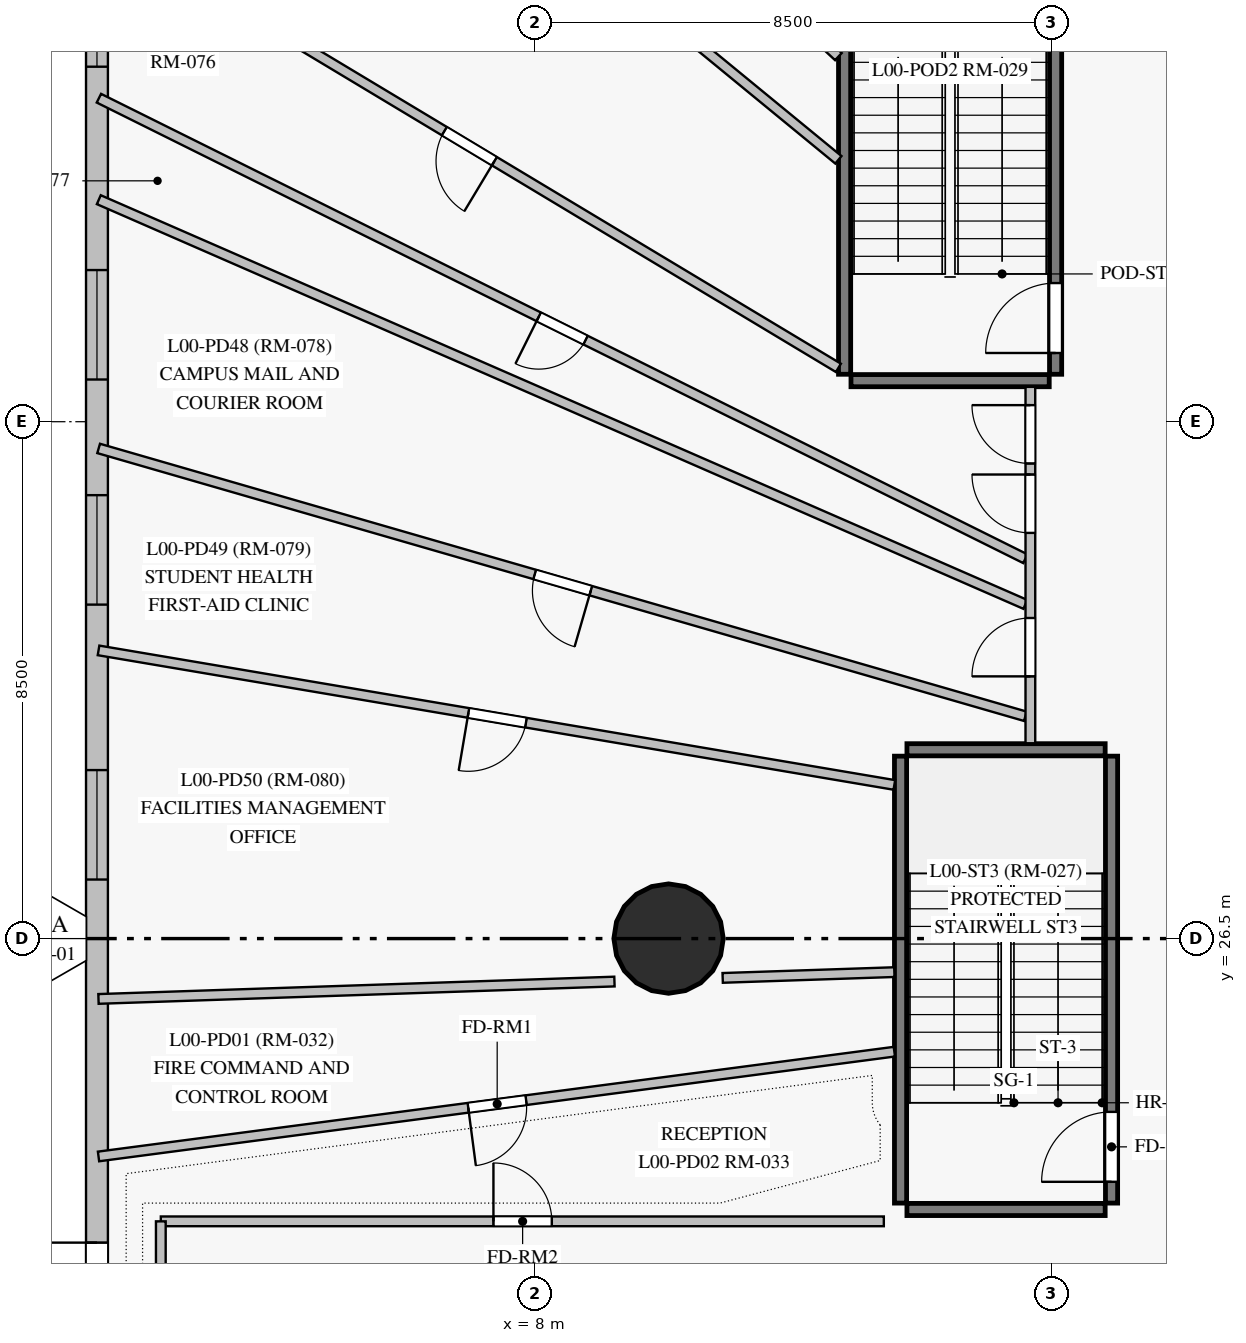
"""IFC4 building model, lengths in metres.
Left out: names, types, materials, properties, quantities, classifications, styles, units other than length and angle.
Written with IfcOpenShell. Run it as: python <this file> out.ifc"""

import sys

from ifc_helpers import new_model, si_unit, direction, frame, frame_2d, origin, origin_with_axes, origin_2d, place, context, subcontext, project, spatial, rectangle, circle, extrude, source, transform, mapped, element, fill, save


model = new_model("IFC4")
c1 = context("Model", 3, precision=1e-05, world=origin(), true_north=direction((0.0, 1.0)))
c2 = subcontext(c1, "Body", "Model", "MODEL_VIEW")
j1 = project(units=[si_unit("LENGTHUNIT", "METRE"), si_unit("PLANEANGLEUNIT", "RADIAN")], contexts=[c1])
p1 = place(None, origin())
s1 = spatial("IfcSite", under=j1, at=p1, CompositionType="ELEMENT")
p2 = place(p1, origin())
s2 = spatial("IfcBuilding", under=s1, at=p2, CompositionType="ELEMENT")
p3 = place(p2, origin())
s3 = spatial("IfcBuildingStorey", under=s2, at=p3, CompositionType="ELEMENT", Elevation=0.0)
m1 = source(origin_with_axes(), c2, "Body", "SweptSolid", [
    extrude(circle(Radius=0.9, at=origin_2d()), origin(), (0.0, 0.0, 1.0), 4.5),
])
p4 = place(p3, frame((10.2, 26.5, 0.0), z_axis=(0.0, 0.0, 1.0), x_axis=(1.0, 0.0, 0.0)))
e1 = element("IfcColumn", 1, at=p4, inside=s3, PredefinedType="COLUMN", context=c2, shape_type="MappedRepresentation", body=[
    mapped(m1, transform((0.0, 0.0, 0.0), scale=1.0)),
])
p5 = place(p3, frame((0.8, 2.5, 0.0), z_axis=(0.0, 0.0, 1.0), x_axis=(0.0, 1.0, 0.0)))
e2 = element("IfcWall", 2, at=p5, inside=s3, PredefinedType="SOLIDWALL", context=c2, shape_type="SweptSolid", body=[
    extrude(rectangle(XDim=48.0, YDim=0.36, at=frame_2d((24.0, 0.0))), origin(), (0.0, 0.0, 1.0), 4.2),
])
p6 = place(p5, frame((42.816, 0.0, 0.85)))
e3 = element("IfcOpeningElement", 3, at=p6, cuts=e2, PredefinedType="OPENING", context=c2, shape_type="SweptSolid", body=[
    extrude(rectangle(XDim=1.8, YDim=2.2, at=frame_2d((0.9, 1.1))), frame((0.0, 0.19, 0.0), z_axis=(0.0, -1.0, 0.0), x_axis=(1.0, 0.0, 0.0)), (0.0, 0.0, 1.0), 0.38),
])
p7 = place(p5, frame((38.338, 0.0, 0.85)))
e4 = element("IfcOpeningElement", 4, at=p7, cuts=e2, PredefinedType="OPENING", context=c2, shape_type="SweptSolid", body=[
    extrude(rectangle(XDim=1.8, YDim=2.2, at=frame_2d((0.9, 1.1))), frame((0.0, 0.19, 0.0), z_axis=(0.0, -1.0, 0.0), x_axis=(1.0, 0.0, 0.0)), (0.0, 0.0, 1.0), 0.38),
])
p8 = place(p5, frame((33.194, 0.0, 0.85)))
e5 = element("IfcOpeningElement", 5, at=p8, cuts=e2, PredefinedType="OPENING", context=c2, shape_type="SweptSolid", body=[
    extrude(rectangle(XDim=1.8, YDim=2.2, at=frame_2d((0.9, 1.1))), frame((0.0, 0.19, 0.0), z_axis=(0.0, -1.0, 0.0), x_axis=(1.0, 0.0, 0.0)), (0.0, 0.0, 1.0), 0.38),
])
p9 = place(p5, frame((29.492, 0.0, 0.85)))
e6 = element("IfcOpeningElement", 6, at=p9, cuts=e2, PredefinedType="OPENING", context=c2, shape_type="SweptSolid", body=[
    extrude(rectangle(XDim=1.8, YDim=2.2, at=frame_2d((0.9, 1.1))), frame((0.0, 0.19, 0.0), z_axis=(0.0, -1.0, 0.0), x_axis=(1.0, 0.0, 0.0)), (0.0, 0.0, 1.0), 0.38),
])
p10 = place(p5, frame((24.971, 0.0, 0.85)))
e7 = element("IfcOpeningElement", 7, at=p10, cuts=e2, PredefinedType="OPENING", context=c2, shape_type="SweptSolid", body=[
    extrude(rectangle(XDim=1.8, YDim=2.2, at=frame_2d((0.9, 1.1))), frame((0.0, 0.19, 0.0), z_axis=(0.0, -1.0, 0.0), x_axis=(1.0, 0.0, 0.0)), (0.0, 0.0, 1.0), 0.38),
])
p11 = place(p5, frame((12.315, 0.0, 0.85)))
e8 = element("IfcOpeningElement", 8, at=p11, cuts=e2, PredefinedType="OPENING", context=c2, shape_type="SweptSolid", body=[
    extrude(rectangle(XDim=1.8, YDim=2.2, at=frame_2d((0.9, 1.1))), frame((0.0, 0.19, 0.0), z_axis=(0.0, -1.0, 0.0), x_axis=(1.0, 0.0, 0.0)), (0.0, 0.0, 1.0), 0.38),
])
p12 = place(p5, frame((6.841, 0.0, 0.85)))
e9 = element("IfcOpeningElement", 9, at=p12, cuts=e2, PredefinedType="OPENING", context=c2, shape_type="SweptSolid", body=[
    extrude(rectangle(XDim=1.8, YDim=2.2, at=frame_2d((0.9, 1.1))), frame((0.0, 0.19, 0.0), z_axis=(0.0, -1.0, 0.0), x_axis=(1.0, 0.0, 0.0)), (0.0, 0.0, 1.0), 0.38),
])
p13 = place(p5, frame((3.189, 0.0, 0.85)))
e10 = element("IfcOpeningElement", 10, at=p13, cuts=e2, PredefinedType="OPENING", context=c2, shape_type="SweptSolid", body=[
    extrude(rectangle(XDim=1.8, YDim=2.2, at=frame_2d((0.9, 1.1))), frame((0.0, 0.19, 0.0), z_axis=(0.0, -1.0, 0.0), x_axis=(1.0, 0.0, 0.0)), (0.0, 0.0, 1.0), 0.38),
])
p14 = place(p5, frame((17.2, 0.0, 0.0)))
e11 = element("IfcOpeningElement", 11, at=p14, cuts=e2, PredefinedType="OPENING", context=c2, shape_type="SweptSolid", body=[
    extrude(rectangle(XDim=1.8, YDim=2.3, at=frame_2d((0.9, 1.15))), frame((0.0, 0.19, 0.0), z_axis=(0.0, -1.0, 0.0), x_axis=(1.0, 0.0, 0.0)), (0.0, 0.0, 1.0), 0.38),
])
p15 = place(p3, frame((14.015, 22.15, 0.0), z_axis=(0.0, 0.0, 1.0), x_axis=(0.0, 1.0, 0.0)))
e12 = element("IfcWall", 12, at=p15, inside=s3, PredefinedType="SHEAR", context=c2, shape_type="SweptSolid", body=[
    extrude(rectangle(XDim=7.35, YDim=0.2, at=frame_2d((3.675, 0.0))), origin(), (0.0, 0.0, 1.0), 4.2),
])
p16 = place(p3, frame((17.485, 22.15, 0.0), z_axis=(0.0, 0.0, 1.0), x_axis=(0.0, 1.0, 0.0)))
e13 = element("IfcWall", 13, at=p16, inside=s3, PredefinedType="SHEAR", context=c2, shape_type="SweptSolid", body=[
    extrude(rectangle(XDim=7.35, YDim=0.2, at=frame_2d((3.675, 0.0))), origin(), (0.0, 0.0, 1.0), 4.2),
])
p17 = place(p16, frame((0.35, 0.0, 0.0)))
e14 = element("IfcOpeningElement", 14, at=p17, cuts=e13, PredefinedType="OPENING", context=c2, shape_type="SweptSolid", body=[
    extrude(rectangle(XDim=1.15, YDim=2.15, at=frame_2d((0.575, 1.075))), frame((0.0, 0.11, 0.0), z_axis=(0.0, -1.0, 0.0), x_axis=(1.0, 0.0, 0.0)), (0.0, 0.0, 1.0), 0.22),
])
p18 = place(p3, frame((13.095, 35.78, 0.0), z_axis=(0.0, 0.0, 1.0), x_axis=(0.0, 1.0, 0.0)))
e15 = element("IfcWall", 15, at=p18, inside=s3, PredefinedType="SHEAR", context=c2, shape_type="SweptSolid", body=[
    extrude(rectangle(XDim=7.35, YDim=0.2, at=frame_2d((3.675, 0.0))), origin(), (0.0, 0.0, 1.0), 4.2),
])
p19 = place(p3, frame((16.565, 35.78, 0.0), z_axis=(0.0, 0.0, 1.0), x_axis=(0.0, 1.0, 0.0)))
e16 = element("IfcWall", 16, at=p19, inside=s3, PredefinedType="SHEAR", context=c2, shape_type="SweptSolid", body=[
    extrude(rectangle(XDim=7.35, YDim=0.2, at=frame_2d((3.675, 0.0))), origin(), (0.0, 0.0, 1.0), 4.2),
])
p20 = place(p19, frame((0.35, 0.0, 0.0)))
e17 = element("IfcOpeningElement", 17, at=p20, cuts=e16, PredefinedType="OPENING", context=c2, shape_type="SweptSolid", body=[
    extrude(rectangle(XDim=1.15, YDim=2.15, at=frame_2d((0.575, 1.075))), frame((0.0, 0.11, 0.0), z_axis=(0.0, -1.0, 0.0), x_axis=(1.0, 0.0, 0.0)), (0.0, 0.0, 1.0), 0.22),
])
p21 = place(p3, frame((13.2, 35.675, 0.0), z_axis=(0.0, 0.0, 1.0), x_axis=(1.0, 0.0, 0.0)))
e18 = element("IfcWall", 18, at=p21, inside=s3, PredefinedType="SHEAR", context=c2, shape_type="SweptSolid", body=[
    extrude(rectangle(XDim=3.26, YDim=0.2, at=frame_2d((1.63, 0.0))), origin(), (0.0, 0.0, 1.0), 4.2),
])
for number, where, z_axis, x_axis in (
    (19, (14.12, 22.045, 0.0), (0.0, 0.0, 1.0), (1.0, 0.0, 0.0)),
    (20, (14.12, 29.605, 0.0), (0.0, 0.0, 1.0), (1.0, 0.0, 0.0)),
):
    element("IfcWall", number, at=place(p3, frame(where, z_axis=z_axis, x_axis=x_axis)), inside=s3, PredefinedType="SHEAR", context=c2, shape_type="SweptSolid", body=[
        extrude(rectangle(XDim=3.26, YDim=0.2, at=frame_2d((1.63, 0.0))), origin(), (0.0, 0.0, 1.0), 4.2),
    ])
p22 = place(p3, frame((16.068, 32.747, 0.0), z_axis=(0.0, 0.0, 1.0), x_axis=(-0.895480769827, 0.44510020318, 0.0)))
e21 = element("IfcWall", 21, at=p22, inside=s3, PredefinedType="PARTITIONING", context=c2, shape_type="SweptSolid", body=[
    extrude(rectangle(XDim=17.015, YDim=0.16, at=frame_2d((8.507, 0.0))), origin(), (0.0, 0.0, 1.0), 4.2),
])
p23 = place(p22, frame((8.077, 0.0, 0.0)))
e22 = element("IfcOpeningElement", 22, at=p23, cuts=e21, PredefinedType="OPENING", context=c2, shape_type="SweptSolid", body=[
    extrude(rectangle(XDim=0.86, YDim=2.04, at=frame_2d((0.43, 1.02))), frame((0.0, 0.09, 0.0), z_axis=(0.0, -1.0, 0.0), x_axis=(1.0, 0.0, 0.0)), (0.0, 0.0, 1.0), 0.18),
])
p24 = place(p3, frame((16.068, 31.996, 0.0), z_axis=(0.0, 0.0, 1.0), x_axis=(-0.916400464202, 0.400262650281, 0.0)))
e23 = element("IfcWall", 23, at=p24, inside=s3, PredefinedType="PARTITIONING", context=c2, shape_type="SweptSolid", body=[
    extrude(rectangle(XDim=16.628, YDim=0.16, at=frame_2d((8.314, 0.0))), origin(), (0.0, 0.0, 1.0), 4.2),
])
p25 = place(p3, frame((16.068, 30.156, 0.0), z_axis=(0.0, 0.0, 1.0), x_axis=(-0.960680893107, 0.277654860608, 0.0)))
e24 = element("IfcWall", 24, at=p25, inside=s3, PredefinedType="PARTITIONING", context=c2, shape_type="SweptSolid", body=[
    extrude(rectangle(XDim=15.864, YDim=0.16, at=frame_2d((7.932, 0.0))), origin(), (0.0, 0.0, 1.0), 4.2),
])
p26 = place(p25, frame((7.44, 0.0, 0.0)))
e25 = element("IfcOpeningElement", 25, at=p26, cuts=e24, PredefinedType="OPENING", context=c2, shape_type="SweptSolid", body=[
    extrude(rectangle(XDim=0.96, YDim=2.15, at=frame_2d((0.48, 1.075))), frame((0.0, 0.09, 0.0), z_axis=(0.0, -1.0, 0.0), x_axis=(1.0, 0.0, 0.0)), (0.0, 0.0, 1.0), 0.18),
])
p27 = place(p3, frame((12.993, 39.307, 0.0), z_axis=(0.0, 0.0, 1.0), x_axis=(-0.772944890545, 0.634473164272, 0.0)))
e26 = element("IfcWall", 26, at=p27, inside=s3, PredefinedType="PARTITIONING", context=c2, shape_type="SweptSolid", body=[
    extrude(rectangle(XDim=15.723, YDim=0.16, at=frame_2d((7.862, 0.0))), origin(), (0.0, 0.0, 1.0), 4.2),
])
p28 = place(p3, frame((12.993, 41.004, 0.0), z_axis=(0.0, 0.0, 1.0), x_axis=(-0.732268799171, 0.681015716236, 0.0)))
e27 = element("IfcWall", 27, at=p28, inside=s3, PredefinedType="PARTITIONING", context=c2, shape_type="SweptSolid", body=[
    extrude(rectangle(XDim=14.905, YDim=0.16, at=frame_2d((7.452, 0.0))), origin(), (0.0, 0.0, 1.0), 4.2),
])
p29 = place(p28, frame((6.96, 0.0, 0.0)))
e28 = element("IfcOpeningElement", 28, at=p29, cuts=e27, PredefinedType="OPENING", context=c2, shape_type="SweptSolid", body=[
    extrude(rectangle(XDim=0.96, YDim=2.15, at=frame_2d((0.48, 1.075))), frame((0.0, 0.09, 0.0), z_axis=(0.0, -1.0, 0.0), x_axis=(1.0, 0.0, 0.0)), (0.0, 0.0, 1.0), 0.18),
])
p30 = place(p3, frame((12.993, 35.885, 0.0), z_axis=(0.0, 0.0, 1.0), x_axis=(-0.857213350392, 0.514961427594, 0.0)))
e29 = element("IfcWall", 29, at=p30, inside=s3, PredefinedType="PARTITIONING", context=c2, shape_type="SweptSolid", body=[
    extrude(rectangle(XDim=14.184, YDim=0.16, at=frame_2d((7.092, 0.0))), origin(), (0.0, 0.0, 1.0), 4.2),
])
p31 = place(p30, frame((6.6, 0.0, 0.0)))
e30 = element("IfcOpeningElement", 30, at=p31, cuts=e29, PredefinedType="OPENING", context=c2, shape_type="SweptSolid", body=[
    extrude(rectangle(XDim=0.96, YDim=2.15, at=frame_2d((0.48, 1.075))), frame((0.0, 0.09, 0.0), z_axis=(0.0, -1.0, 0.0), x_axis=(1.0, 0.0, 0.0)), (0.0, 0.0, 1.0), 0.18),
])
p32 = place(p3, frame((13.913, 29.027, 0.0), z_axis=(0.0, 0.0, 1.0), x_axis=(-0.986009968188, 0.166686360073, 0.0)))
e31 = element("IfcWall", 31, at=p32, inside=s3, PredefinedType="PARTITIONING", context=c2, shape_type="SweptSolid", body=[
    extrude(rectangle(XDim=13.273, YDim=0.16, at=frame_2d((6.636, 0.0))), origin(), (0.0, 0.0, 1.0), 4.2),
])
p33 = place(p32, frame((6.144, 0.0, 0.0)))
e32 = element("IfcOpeningElement", 32, at=p33, cuts=e31, PredefinedType="OPENING", context=c2, shape_type="SweptSolid", body=[
    extrude(rectangle(XDim=0.96, YDim=2.15, at=frame_2d((0.48, 1.075))), frame((0.0, 0.09, 0.0), z_axis=(0.0, -1.0, 0.0), x_axis=(1.0, 0.0, 0.0)), (0.0, 0.0, 1.0), 0.18),
])
p34 = place(p3, frame((13.913, 24.64, 0.0), z_axis=(0.0, 0.0, 1.0), x_axis=(-0.991443338572, -0.130537758528, 0.0)))
e33 = element("IfcWall", 33, at=p34, inside=s3, PredefinedType="PARTITIONING", context=c2, shape_type="SweptSolid", body=[
    extrude(rectangle(XDim=13.2, YDim=0.16, at=frame_2d((6.6, 0.0))), origin(), (0.0, 0.0, 1.0), 4.2),
])
p35 = place(p34, frame((6.108, 0.0, 0.0)))
e34 = element("IfcOpeningElement", 34, at=p35, cuts=e33, PredefinedType="OPENING", context=c2, shape_type="SweptSolid", body=[
    extrude(rectangle(XDim=0.96, YDim=2.15, at=frame_2d((0.48, 1.075))), frame((0.0, 0.09, 0.0), z_axis=(0.0, -1.0, 0.0), x_axis=(1.0, 0.0, 0.0)), (0.0, 0.0, 1.0), 0.18),
])
p36 = place(p3, frame((1.85, 21.85, 0.0), z_axis=(0.0, 0.0, 1.0), x_axis=(1.0, 0.0, 0.0)))
e35 = element("IfcWall", 35, at=p36, inside=s3, PredefinedType="PARTITIONING", context=c2, shape_type="SweptSolid", body=[
    extrude(rectangle(XDim=11.89, YDim=0.16, at=frame_2d((5.945, 0.0))), origin(), (0.0, 0.0, 1.0), 4.2),
])
p37 = place(p36, frame((5.47, 0.0, 0.0)))
e36 = element("IfcOpeningElement", 36, at=p37, cuts=e35, PredefinedType="OPENING", context=c2, shape_type="SweptSolid", body=[
    extrude(rectangle(XDim=0.96, YDim=2.15, at=frame_2d((0.48, 1.075))), frame((0.0, 0.09, 0.0), z_axis=(0.0, -1.0, 0.0), x_axis=(1.0, 0.0, 0.0)), (0.0, 0.0, 1.0), 0.18),
])
p38 = place(p3, frame((0.825, 25.508, 0.0), z_axis=(0.0, 0.0, 1.0), x_axis=(0.999432873897, 0.033673885638, 0.0)))
e37 = element("IfcWall", 37, at=p38, inside=s3, PredefinedType="PARTITIONING", context=c2, shape_type="SweptSolid", body=[
    extrude(rectangle(XDim=8.49, YDim=0.16, at=frame_2d((4.245, 0.0))), origin(), (0.0, 0.0, 1.0), 4.2),
])
p39 = place(p3, frame((16.15, 29.712, 0.0), z_axis=(0.0, 0.0, 1.0), x_axis=(0.0, 1.0, 0.0)))
e38 = element("IfcWall", 38, at=p39, inside=s3, PredefinedType="PARTITIONING", context=c2, shape_type="SweptSolid", body=[
    extrude(rectangle(XDim=5.861, YDim=0.16, at=frame_2d((2.93, 0.0))), origin(), (0.0, 0.0, 1.0), 4.2),
])
p40 = place(p39, frame((3.459, 0.0, 0.0)))
e39 = element("IfcOpeningElement", 39, at=p40, cuts=e38, PredefinedType="OPENING", context=c2, shape_type="SweptSolid", body=[
    extrude(rectangle(XDim=0.96, YDim=2.15, at=frame_2d((0.48, 1.075))), frame((0.0, 0.09, 0.0), z_axis=(0.0, -1.0, 0.0), x_axis=(1.0, 0.0, 0.0)), (0.0, 0.0, 1.0), 0.18),
])
p41 = place(p39, frame((1.1, 0.0, 0.0)))
e40 = element("IfcOpeningElement", 40, at=p41, cuts=e38, PredefinedType="OPENING", context=c2, shape_type="SweptSolid", body=[
    extrude(rectangle(XDim=0.96, YDim=2.15, at=frame_2d((0.48, 1.075))), frame((0.0, 0.09, 0.0), z_axis=(0.0, -1.0, 0.0), x_axis=(1.0, 0.0, 0.0)), (0.0, 0.0, 1.0), 0.18),
])
p42 = place(p39, frame((4.601, 0.0, 0.0)))
e41 = element("IfcOpeningElement", 41, at=p42, cuts=e38, PredefinedType="OPENING", context=c2, shape_type="SweptSolid", body=[
    extrude(rectangle(XDim=0.96, YDim=2.15, at=frame_2d((0.48, 1.075))), frame((0.0, 0.09, 0.0), z_axis=(0.0, -1.0, 0.0), x_axis=(1.0, 0.0, 0.0)), (0.0, 0.0, 1.0), 0.18),
])
p43 = place(p3, frame((11.09, 25.854, 0.0), z_axis=(0.0, 0.0, 1.0), x_axis=(0.999434594921, 0.033622767225, 0.0)))
e42 = element("IfcWall", 42, at=p43, inside=s3, PredefinedType="PARTITIONING", context=c2, shape_type="SweptSolid", body=[
    extrude(rectangle(XDim=2.825, YDim=0.16, at=frame_2d((1.412, 0.0))), origin(), (0.0, 0.0, 1.0), 3.25),
])
p44 = place(p3, frame((1.85, 19.4, 0.0), z_axis=(0.0, 0.0, 1.0), x_axis=(0.0, 1.0, 0.0)))
e43 = element("IfcWall", 43, at=p44, inside=s3, PredefinedType="PARTITIONING", context=c2, shape_type="SweptSolid", body=[
    extrude(rectangle(XDim=2.45, YDim=0.16, at=frame_2d((1.225, 0.0))), origin(), (0.0, 0.0, 1.0), 4.2),
])
m2 = source(origin_with_axes(), c2, "Body", "SweptSolid", [
    extrude(rectangle(XDim=1.8, YDim=2.2, at=frame_2d((0.9, 1.1))), frame((0.0, 0.03, 0.0), z_axis=(0.0, -1.0, 0.0), x_axis=(1.0, 0.0, 0.0)), (0.0, 0.0, 1.0), 0.06),
])
p45 = place(p7, origin())
e44 = element("IfcWindow", 44, at=p45, inside=s3, PartitioningType="SINGLE_PANEL", PredefinedType="WINDOW", context=c2, shape_type="MappedRepresentation", body=[
    mapped(m2, transform((0.0, 0.0, 0.0), scale=1.0)),
])
fill(e4, e44)
p46 = place(p8, origin())
e45 = element("IfcWindow", 45, at=p46, inside=s3, PartitioningType="SINGLE_PANEL", PredefinedType="WINDOW", context=c2, shape_type="MappedRepresentation", body=[
    mapped(m2, transform((0.0, 0.0, 0.0), scale=1.0)),
])
fill(e5, e45)
p47 = place(p9, origin())
e46 = element("IfcWindow", 46, at=p47, inside=s3, PartitioningType="SINGLE_PANEL", PredefinedType="WINDOW", context=c2, shape_type="MappedRepresentation", body=[
    mapped(m2, transform((0.0, 0.0, 0.0), scale=1.0)),
])
fill(e6, e46)
p48 = place(p10, origin())
e47 = element("IfcWindow", 47, at=p48, inside=s3, PartitioningType="SINGLE_PANEL", PredefinedType="WINDOW", context=c2, shape_type="MappedRepresentation", body=[
    mapped(m2, transform((0.0, 0.0, 0.0), scale=1.0)),
])
fill(e7, e47)
m3 = source(origin_with_axes(), c2, "Body", "SweptSolid", [
    extrude(rectangle(XDim=1.8, YDim=2.3, at=frame_2d((0.9, 1.15))), frame((0.0, 0.025, 0.0), z_axis=(0.0, -1.0, 0.0), x_axis=(1.0, 0.0, 0.0)), (0.0, 0.0, 1.0), 0.05),
])
p49 = place(p14, origin())
e48 = element("IfcDoor", 48, at=p49, inside=s3, OperationType="DOUBLE_DOOR_SINGLE_SWING", PredefinedType="DOOR", context=c2, shape_type="MappedRepresentation", body=[
    mapped(m3, transform((0.0, 0.0, 0.0), scale=1.0)),
])
fill(e11, e48)
m4 = source(origin_with_axes(), c2, "Body", "SweptSolid", [
    extrude(rectangle(XDim=1.15, YDim=2.15, at=frame_2d((0.575, 1.075))), frame((0.0, 0.025, 0.0), z_axis=(0.0, -1.0, 0.0), x_axis=(1.0, 0.0, 0.0)), (0.0, 0.0, 1.0), 0.05),
])
p50 = place(p17, origin())
e49 = element("IfcDoor", 49, at=p50, inside=s3, OperationType="SINGLE_SWING_LEFT", PredefinedType="DOOR", context=c2, shape_type="MappedRepresentation", body=[
    mapped(m4, transform((0.0, 0.0, 0.0), scale=1.0)),
])
fill(e14, e49)
p51 = place(p20, origin())
e50 = element("IfcDoor", 50, at=p51, inside=s3, OperationType="SINGLE_SWING_LEFT", PredefinedType="DOOR", context=c2, shape_type="MappedRepresentation", body=[
    mapped(m4, transform((0.0, 0.0, 0.0), scale=1.0)),
])
fill(e17, e50)
m5 = source(origin_with_axes(), c2, "Body", "SweptSolid", [
    extrude(rectangle(XDim=0.96, YDim=2.15, at=frame_2d((0.48, 1.075))), frame((0.0, 0.025, 0.0), z_axis=(0.0, -1.0, 0.0), x_axis=(1.0, 0.0, 0.0)), (0.0, 0.0, 1.0), 0.05),
])
p52 = place(p35, origin())
e51 = element("IfcDoor", 51, at=p52, inside=s3, OperationType="SINGLE_SWING_RIGHT", PredefinedType="DOOR", context=c2, shape_type="MappedRepresentation", body=[
    mapped(m5, transform((0.0, 0.0, 0.0), scale=1.0)),
])
fill(e34, e51)
p53 = place(p37, origin())
e52 = element("IfcDoor", 52, at=p53, inside=s3, OperationType="SINGLE_SWING_LEFT", PredefinedType="DOOR", context=c2, shape_type="MappedRepresentation", body=[
    mapped(m5, transform((0.0, 0.0, 0.0), scale=1.0)),
])
fill(e36, e52)
p54 = place(p31, origin())
e53 = element("IfcDoor", 53, at=p54, inside=s3, OperationType="SINGLE_SWING_LEFT", PredefinedType="DOOR", context=c2, shape_type="MappedRepresentation", body=[
    mapped(m5, transform((0.0, 0.0, 0.0), scale=1.0)),
])
fill(e30, e53)
p55 = place(p40, origin())
e54 = element("IfcDoor", 54, at=p55, inside=s3, OperationType="SINGLE_SWING_RIGHT", PredefinedType="DOOR", context=c2, shape_type="MappedRepresentation", body=[
    mapped(m5, transform((0.0, 0.0, 0.0), scale=1.0)),
])
fill(e39, e54)
p56 = place(p41, origin())
e55 = element("IfcDoor", 55, at=p56, inside=s3, OperationType="SINGLE_SWING_LEFT", PredefinedType="DOOR", context=c2, shape_type="MappedRepresentation", body=[
    mapped(m5, transform((0.0, 0.0, 0.0), scale=1.0)),
])
fill(e40, e55)
p57 = place(p42, origin())
e56 = element("IfcDoor", 56, at=p57, inside=s3, OperationType="SINGLE_SWING_RIGHT", PredefinedType="DOOR", context=c2, shape_type="MappedRepresentation", body=[
    mapped(m5, transform((0.0, 0.0, 0.0), scale=1.0)),
])
fill(e41, e56)
p58 = place(p26, origin())
e57 = element("IfcDoor", 57, at=p58, inside=s3, OperationType="SINGLE_SWING_LEFT", PredefinedType="DOOR", context=c2, shape_type="MappedRepresentation", body=[
    mapped(m5, transform((0.0, 0.0, 0.0), scale=1.0)),
])
fill(e25, e57)
p59 = place(p33, origin())
e58 = element("IfcDoor", 58, at=p59, inside=s3, OperationType="SINGLE_SWING_RIGHT", PredefinedType="DOOR", context=c2, shape_type="MappedRepresentation", body=[
    mapped(m5, transform((0.0, 0.0, 0.0), scale=1.0)),
])
fill(e32, e58)
m6 = source(origin_with_axes(), c2, "Body", "SweptSolid", [
    extrude(rectangle(XDim=0.86, YDim=2.04, at=frame_2d((0.43, 1.02))), frame((0.0, 0.025, 0.0), z_axis=(0.0, -1.0, 0.0), x_axis=(1.0, 0.0, 0.0)), (0.0, 0.0, 1.0), 0.05),
])
p60 = place(p23, origin())
e59 = element("IfcDoor", 59, at=p60, inside=s3, OperationType="SINGLE_SWING_RIGHT", PredefinedType="DOOR", context=c2, shape_type="MappedRepresentation", body=[
    mapped(m6, transform((0.0, 0.0, 0.0), scale=1.0)),
])
fill(e22, e59)
save(model, sys.argv[1])
